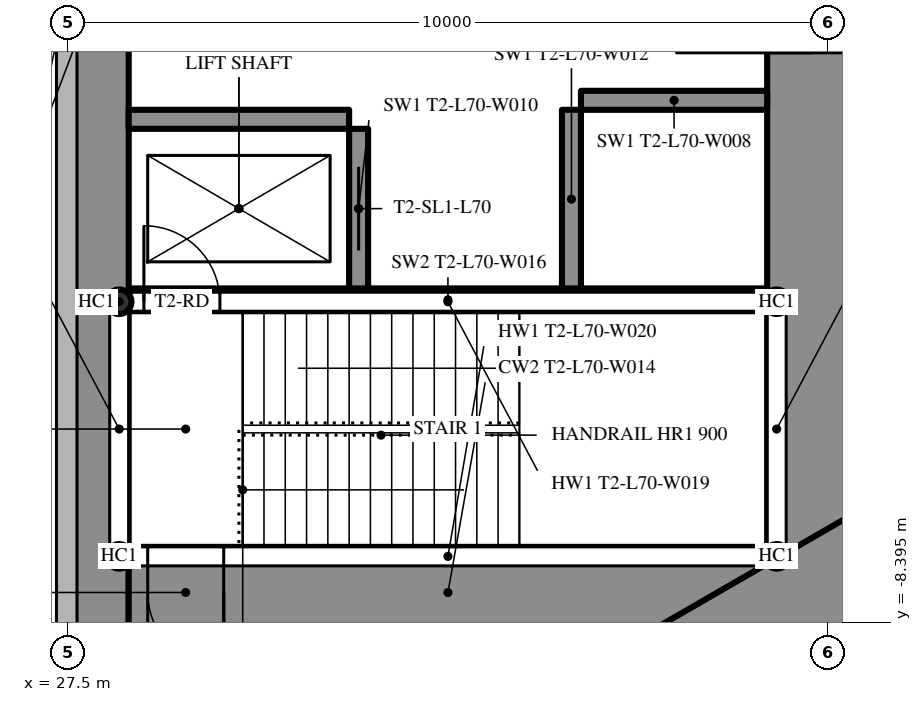
"""IFC4 building model, lengths in metres.
Left out: names, types, materials, properties, quantities, classifications, styles, units other than length and angle.
Written with IfcOpenShell. Run it as: python <this file> out.ifc"""

import sys

from ifc_helpers import new_model, si_unit, direction, frame, frame_2d, origin, origin_2d, place, context, subcontext, project, spatial, rectangle, hollow_circle, extrude, element, fill, save


model = new_model("IFC4")
c1 = context("Model", 3, precision=1e-05, world=origin(), true_north=direction((0.0, 1.0)))
c2 = subcontext(c1, "Body", "Model", "MODEL_VIEW")
j1 = project(units=[si_unit("LENGTHUNIT", "METRE"), si_unit("PLANEANGLEUNIT", "RADIAN")], contexts=[c1])
p1 = place(None, origin())
s1 = spatial("IfcSite", under=j1, at=p1, CompositionType="ELEMENT")
p2 = place(p1, origin())
s2 = spatial("IfcBuilding", under=s1, at=p2, CompositionType="ELEMENT")
p3 = place(p2, frame((0.0, 0.0, 268.3)))
s3 = spatial("IfcBuildingStorey", under=s2, at=p3, CompositionType="ELEMENT", Elevation=268.3)
p4 = place(p3, frame((27.9, -8.6, 0.0), z_axis=(0.0, 0.0, 1.0), x_axis=(0.0, 1.0, 0.0)))
e1 = element("IfcWall", 1, at=p4, inside=s3, PredefinedType="SHEAR", context=c2, shape_type="SweptSolid", body=[
    extrude(rectangle(XDim=17.2, YDim=0.8, at=frame_2d((8.6, 0.0))), origin(), (0.0, 0.0, 1.0), 5.0),
])
p5 = place(p4, frame((9.35, 0.0, 0.0)))
e2 = element("IfcOpeningElement", 2, at=p5, cuts=e1, PredefinedType="OPENING", context=c2, shape_type="SweptSolid", body=[
    extrude(rectangle(XDim=0.9, YDim=2.2, at=frame_2d((0.45, 1.1))), frame((0.0, 0.41, 0.0), z_axis=(0.0, -1.0, 0.0), x_axis=(1.0, 0.0, 0.0)), (0.0, 0.0, 1.0), 0.82),
])
p6 = place(p3, frame((37.3, -8.6, 0.0), z_axis=(0.0, 0.0, 1.0), x_axis=(0.0, 1.0, 0.0)))
e3 = element("IfcWall", 3, at=p6, inside=s3, PredefinedType="SHEAR", context=c2, shape_type="SweptSolid", body=[
    extrude(rectangle(XDim=17.2, YDim=1.2, at=frame_2d((8.6, 0.0))), origin(), (0.0, 0.0, 1.0), 5.0),
])
p7 = place(p6, frame((7.7, 0.0, 0.0)))
e4 = element("IfcOpeningElement", 4, at=p7, cuts=e3, PredefinedType="OPENING", context=c2, shape_type="SweptSolid", body=[
    extrude(rectangle(XDim=1.8, YDim=2.2, at=frame_2d((0.9, 1.1))), frame((0.0, 0.61, 0.0), z_axis=(0.0, -1.0, 0.0), x_axis=(1.0, 0.0, 0.0)), (0.0, 0.0, 1.0), 1.22),
])
p8 = place(p3, frame((28.3, -8.0, 0.0), z_axis=(0.0, 0.0, 1.0), x_axis=(1.0, 0.0, 0.0)))
e5 = element("IfcWall", 5, at=p8, inside=s3, PredefinedType="SHEAR", context=c2, shape_type="SweptSolid", body=[
    extrude(rectangle(XDim=8.4, YDim=1.2, at=frame_2d((4.2, 0.0))), origin(), (0.0, 0.0, 1.0), 5.0),
])
p9 = place(p8, frame((0.25, 0.0, 0.0)))
e6 = element("IfcOpeningElement", 6, at=p9, cuts=e5, PredefinedType="OPENING", context=c2, shape_type="SweptSolid", body=[
    extrude(rectangle(XDim=1.0, YDim=2.2, at=frame_2d((0.5, 1.1))), frame((0.0, 0.61, 0.0), z_axis=(0.0, -1.0, 0.0), x_axis=(1.0, 0.0, 0.0)), (0.0, 0.0, 1.0), 1.22),
])
p10 = place(p3, frame((28.3, -4.15, 0.0), z_axis=(0.0, 0.0, 1.0), x_axis=(1.0, 0.0, 0.0)))
e7 = element("IfcWall", 7, at=p10, inside=s3, PredefinedType="SHEAR", context=c2, shape_type="SweptSolid", body=[
    extrude(rectangle(XDim=8.4, YDim=0.3, at=frame_2d((4.2, 0.0))), origin(), (0.0, 0.0, 1.0), 5.0),
])
p11 = place(p3, frame((31.325, -4.0, 0.0), z_axis=(0.0, 0.0, 1.0), x_axis=(0.0, 1.0, 0.0)))
e8 = element("IfcWall", 8, at=p11, inside=s3, PredefinedType="SHEAR", context=c2, shape_type="SweptSolid", body=[
    extrude(rectangle(XDim=2.1, YDim=0.25, at=frame_2d((1.05, 0.0))), origin(), (0.0, 0.0, 1.0), 5.0),
])
p12 = place(p11, frame((0.5, 0.0, 0.0)))
e9 = element("IfcOpeningElement", 9, at=p12, cuts=e8, PredefinedType="OPENING", context=c2, shape_type="SweptSolid", body=[
    extrude(rectangle(XDim=1.1, YDim=2.2, at=frame_2d((0.55, 1.1))), frame((0.0, 0.135, 0.0), z_axis=(0.0, -1.0, 0.0), x_axis=(1.0, 0.0, 0.0)), (0.0, 0.0, 1.0), 0.27),
])
p13 = place(p3, frame((34.125, -4.0, 0.0), z_axis=(0.0, 0.0, 1.0), x_axis=(0.0, 1.0, 0.0)))
e10 = element("IfcWall", 10, at=p13, inside=s3, PredefinedType="SHEAR", context=c2, shape_type="SweptSolid", body=[
    extrude(rectangle(XDim=2.35, YDim=0.25, at=frame_2d((1.175, 0.0))), origin(), (0.0, 0.0, 1.0), 5.0),
])
p14 = place(p3, frame((28.3, -1.775, 0.0), z_axis=(0.0, 0.0, 1.0), x_axis=(1.0, 0.0, 0.0)))
e11 = element("IfcWall", 11, at=p14, inside=s3, PredefinedType="SHEAR", context=c2, shape_type="SweptSolid", body=[
    extrude(rectangle(XDim=2.9, YDim=0.25, at=frame_2d((1.45, 0.0))), origin(), (0.0, 0.0, 1.0), 5.0),
])
p15 = place(p3, frame((34.25, -1.525, 0.0), z_axis=(0.0, 0.0, 1.0), x_axis=(1.0, 0.0, 0.0)))
e12 = element("IfcWall", 12, at=p15, inside=s3, PredefinedType="SHEAR", context=c2, shape_type="SweptSolid", body=[
    extrude(rectangle(XDim=2.45, YDim=0.25, at=frame_2d((1.225, 0.0))), origin(), (0.0, 0.0, 1.0), 5.0),
])
p16 = place(p3, frame((27.2, -13.8, 0.0), z_axis=(0.0, 0.0, 1.0), x_axis=(0.866027159892, 0.499996958321, 0.0)))
e13 = element("IfcWall", 13, at=p16, inside=s3, PredefinedType="SHEAR", context=c2, shape_type="SweptSolid", body=[
    extrude(rectangle(XDim=27.947, YDim=1.2, at=frame_2d((13.973, 0.0))), origin(), (0.0, 0.0, 1.0), 5.0),
])
p17 = place(p16, frame((4.6, 0.0, 0.0)))
e14 = element("IfcOpeningElement", 14, at=p17, cuts=e13, PredefinedType="OPENING", context=c2, shape_type="SweptSolid", body=[
    extrude(rectangle(XDim=1.0, YDim=2.2, at=frame_2d((0.5, 1.1))), frame((0.0, 0.61, 0.0), z_axis=(0.0, -1.0, 0.0), x_axis=(1.0, 0.0, 0.0)), (0.0, 0.0, 1.0), 1.22),
])
p18 = place(p16, frame((13.395, 0.0, 0.0)))
e15 = element("IfcOpeningElement", 15, at=p18, cuts=e13, PredefinedType="OPENING", context=c2, shape_type="SweptSolid", body=[
    extrude(rectangle(XDim=1.8, YDim=2.2, at=frame_2d((0.9, 1.1))), frame((0.0, 0.61, 0.0), z_axis=(0.0, -1.0, 0.0), x_axis=(1.0, 0.0, 0.0)), (0.0, 0.0, 1.0), 1.22),
])
for number, where, z_axis, x_axis in (
    (16, (28.175, -7.525, 5.0), (0.0, 0.0, 1.0), (1.0, 0.0, 0.0)),
    (17, (36.825, -7.525, 5.0), (0.0, 0.0, 1.0), (1.0, 0.0, 0.0)),
    (18, (28.175, -4.175, 5.0), (0.0, 0.0, 1.0), (1.0, 0.0, 0.0)),
    (19, (36.825, -4.175, 5.0), (0.0, 0.0, 1.0), (1.0, 0.0, 0.0)),
):
    element("IfcColumn", number, at=place(p3, frame(where, z_axis=z_axis, x_axis=x_axis)), inside=s3, PredefinedType="COLUMN", context=c2, shape_type="SweptSolid", body=[
        extrude(hollow_circle(Radius=0.162, WallThickness=0.012, at=origin_2d()), origin(), (0.0, 0.0, 1.0), 3.0),
    ])
for number, where, z_axis, x_axis in (
    (20, (28.175, -7.422, 5.0), (0.0, 0.0, 1.0), (0.0, 1.0, 0.0)),
    (21, (36.825, -7.422, 5.0), (0.0, 0.0, 1.0), (0.0, 1.0, 0.0)),
):
    element("IfcWall", number, at=place(p3, frame(where, z_axis=z_axis, x_axis=x_axis)), inside=s3, PredefinedType="SOLIDWALL", context=c2, shape_type="SweptSolid", body=[
        extrude(rectangle(XDim=3.144, YDim=0.25, at=frame_2d((1.572, 0.0))), origin(), (0.0, 0.0, 1.0), 2.54),
    ])
p19 = place(p3, frame((28.278, -7.525, 5.0), z_axis=(0.0, 0.0, 1.0), x_axis=(1.0, 0.0, 0.0)))
e22 = element("IfcWall", 22, at=p19, inside=s3, PredefinedType="SOLIDWALL", context=c2, shape_type="SweptSolid", body=[
    extrude(rectangle(XDim=8.444, YDim=0.25, at=frame_2d((4.222, 0.0))), origin(), (0.0, 0.0, 1.0), 2.54),
])
p20 = place(p3, frame((28.278, -4.175, 5.0), z_axis=(0.0, 0.0, 1.0), x_axis=(1.0, 0.0, 0.0)))
e23 = element("IfcWall", 23, at=p20, inside=s3, PredefinedType="SOLIDWALL", context=c2, shape_type="SweptSolid", body=[
    extrude(rectangle(XDim=8.444, YDim=0.25, at=frame_2d((4.222, 0.0))), origin(), (0.0, 0.0, 1.0), 2.54),
])
p21 = place(p20, frame((0.222, 0.0, 0.0)))
e24 = element("IfcOpeningElement", 24, at=p21, cuts=e23, PredefinedType="OPENING", context=c2, shape_type="SweptSolid", body=[
    extrude(rectangle(XDim=1.0, YDim=2.2, at=frame_2d((0.5, 1.1))), frame((0.0, 0.135, 0.0), z_axis=(0.0, -1.0, 0.0), x_axis=(1.0, 0.0, 0.0)), (0.0, 0.0, 1.0), 0.27),
])
p22 = place(p3, frame((28.959, -15.44, 0.0), z_axis=(0.0, 0.0, 1.0), x_axis=(0.866025227435, 0.500000305447, 0.0)))
e25 = element("IfcWall", 25, at=p22, inside=s3, PredefinedType="PARTITIONING", context=c2, shape_type="SweptSolid", body=[
    extrude(rectangle(XDim=30.88, YDim=0.2, at=frame_2d((15.44, 0.0))), origin(), (0.0, 0.0, 1.0), 4.7),
])
p23 = place(p22, frame((6.994, 0.0, 0.0)))
e26 = element("IfcOpeningElement", 26, at=p23, cuts=e25, PredefinedType="OPENING", context=c2, shape_type="SweptSolid", body=[
    extrude(rectangle(XDim=2.0, YDim=2.4, at=frame_2d((1.0, 1.2))), frame((0.0, 0.11, 0.0), z_axis=(0.0, -1.0, 0.0), x_axis=(1.0, 0.0, 0.0)), (0.0, 0.0, 1.0), 0.22),
])
p24 = place(p22, frame((16.704, 0.0, 0.0)))
e27 = element("IfcOpeningElement", 27, at=p24, cuts=e25, PredefinedType="OPENING", context=c2, shape_type="SweptSolid", body=[
    extrude(rectangle(XDim=2.0, YDim=2.4, at=frame_2d((1.0, 1.2))), frame((0.0, 0.11, 0.0), z_axis=(0.0, -1.0, 0.0), x_axis=(1.0, 0.0, 0.0)), (0.0, 0.0, 1.0), 0.22),
])
p25 = place(p22, frame((20.587, 0.0, 0.0)))
e28 = element("IfcOpeningElement", 28, at=p25, cuts=e25, PredefinedType="OPENING", context=c2, shape_type="SweptSolid", body=[
    extrude(rectangle(XDim=2.0, YDim=2.4, at=frame_2d((1.0, 1.2))), frame((0.0, 0.11, 0.0), z_axis=(0.0, -1.0, 0.0), x_axis=(1.0, 0.0, 0.0)), (0.0, 0.0, 1.0), 0.22),
])
p26 = place(p22, frame((26.092, 0.0, 0.0)))
e29 = element("IfcOpeningElement", 29, at=p26, cuts=e25, PredefinedType="OPENING", context=c2, shape_type="SweptSolid", body=[
    extrude(rectangle(XDim=2.0, YDim=2.4, at=frame_2d((1.0, 1.2))), frame((0.0, 0.11, 0.0), z_axis=(0.0, -1.0, 0.0), x_axis=(1.0, 0.0, 0.0)), (0.0, 0.0, 1.0), 0.22),
])
p27 = place(p21, origin())
e30 = element("IfcDoor", 30, at=p27, inside=s3, OperationType="SINGLE_SWING_LEFT", PredefinedType="DOOR", context=c2, shape_type="SweptSolid", body=[
    extrude(rectangle(XDim=1.0, YDim=2.2, at=frame_2d((0.5, 1.1))), frame((0.0, 0.025, 0.0), z_axis=(0.0, -1.0, 0.0), x_axis=(1.0, 0.0, 0.0)), (0.0, 0.0, 1.0), 0.05),
])
fill(e24, e30)
p28 = place(p7, origin())
e31 = element("IfcDoor", 31, at=p28, inside=s3, OperationType="DOUBLE_DOOR_SINGLE_SWING", PredefinedType="DOOR", context=c2, shape_type="SweptSolid", body=[
    extrude(rectangle(XDim=1.8, YDim=2.2, at=frame_2d((0.9, 1.1))), frame((0.0, 0.025, 0.0), z_axis=(0.0, -1.0, 0.0), x_axis=(1.0, 0.0, 0.0)), (0.0, 0.0, 1.0), 0.05),
])
fill(e4, e31)
p29 = place(p9, origin())
e32 = element("IfcDoor", 32, at=p29, inside=s3, OperationType="SINGLE_SWING_RIGHT", PredefinedType="DOOR", context=c2, shape_type="SweptSolid", body=[
    extrude(rectangle(XDim=1.0, YDim=2.2, at=frame_2d((0.5, 1.1))), frame((0.0, 0.025, 0.0), z_axis=(0.0, -1.0, 0.0), x_axis=(1.0, 0.0, 0.0)), (0.0, 0.0, 1.0), 0.05),
])
fill(e6, e32)
p30 = place(p12, origin())
e33 = element("IfcDoor", 33, at=p30, inside=s3, OperationType="SLIDING_TO_LEFT", PredefinedType="USERDEFINED", context=c2, shape_type="SweptSolid", body=[
    extrude(rectangle(XDim=1.1, YDim=2.2, at=frame_2d((0.55, 1.1))), frame((0.0, 0.025, 0.0), z_axis=(0.0, -1.0, 0.0), x_axis=(1.0, 0.0, 0.0)), (0.0, 0.0, 1.0), 0.05),
])
fill(e9, e33)
save(model, sys.argv[1])
